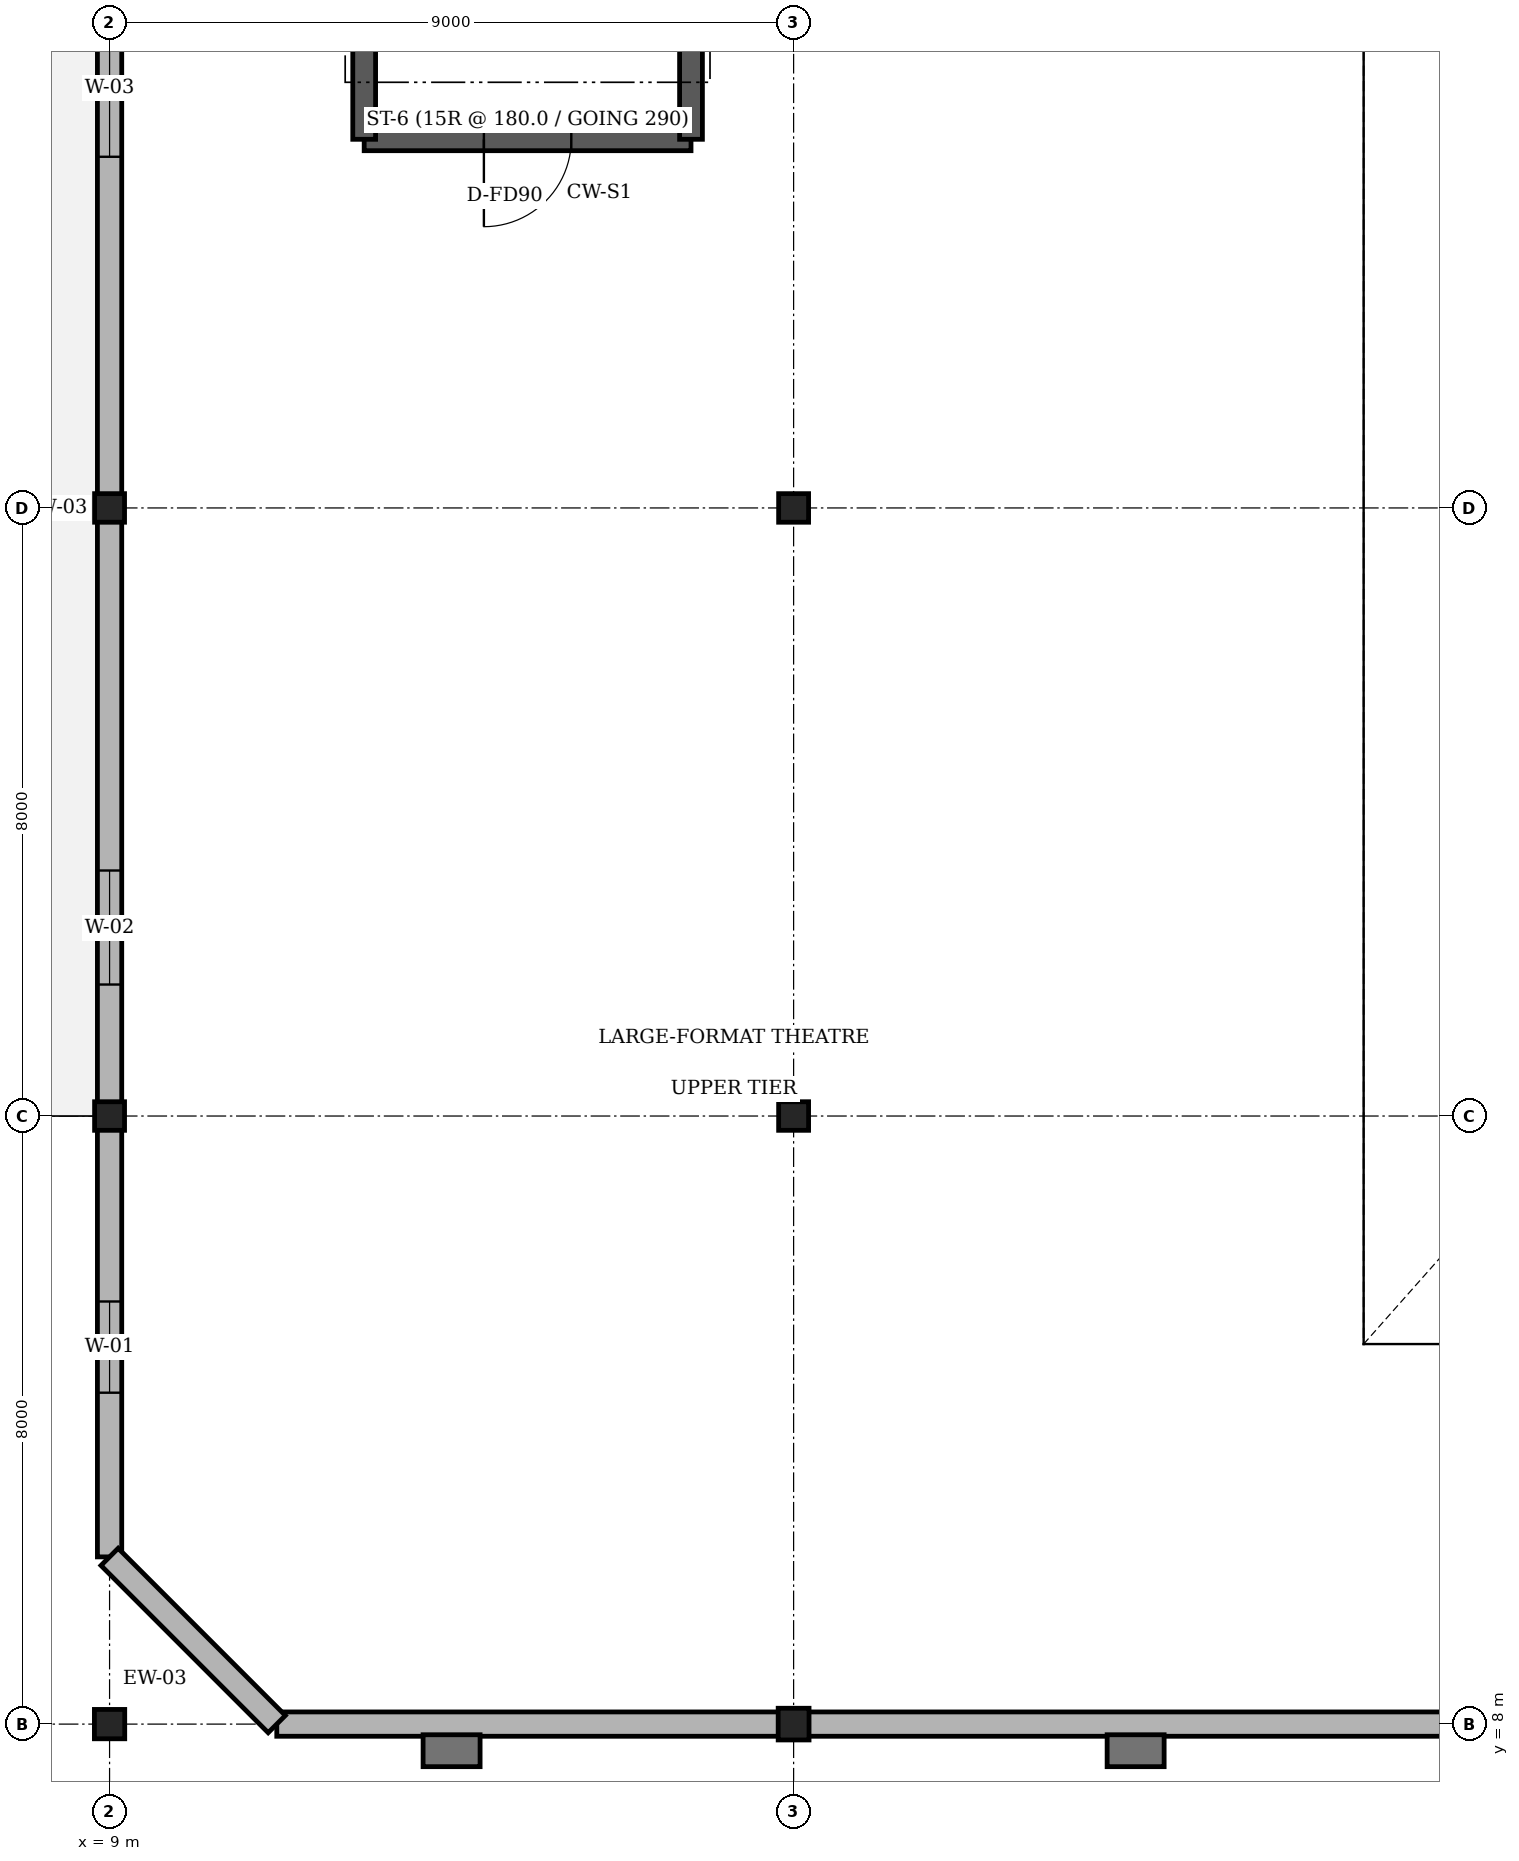
"""IFC4 building model, lengths in metres.
Left out: names, types, materials, properties, quantities, classifications, styles, units other than length and angle.
Written with IfcOpenShell. Run it as: python <this file> out.ifc"""

import sys

from ifc_helpers import new_model, si_unit, direction, frame, frame_2d, origin, origin_2d, place, context, subcontext, project, spatial, rectangle, i_section, extrude, element, fill, save


model = new_model("IFC4")
c1 = context("Model", 3, precision=1e-05, world=origin(), true_north=direction((0.0, 1.0)))
c2 = subcontext(c1, "Body", "Model", "MODEL_VIEW")
j1 = project(units=[si_unit("LENGTHUNIT", "METRE"), si_unit("PLANEANGLEUNIT", "RADIAN")], contexts=[c1])
p1 = place(None, origin())
s1 = spatial("IfcSite", under=j1, at=p1, CompositionType="ELEMENT")
p2 = place(p1, origin())
s2 = spatial("IfcBuilding", under=s1, at=p2, CompositionType="ELEMENT")
p3 = place(p2, frame((0.0, 0.0, 5.4)))
s3 = spatial("IfcBuildingStorey", under=s2, at=p3, CompositionType="ELEMENT", Elevation=5.4)
p4 = place(p3, frame((9.0, 8.0, 0.0), z_axis=(0.0, 0.0, 1.0), x_axis=(1.0, 0.0, 0.0)))
e1 = element("IfcColumn", 1, at=p4, inside=s3, PredefinedType="COLUMN", context=c2, shape_type="SweptSolid", body=[
    extrude(i_section(OverallWidth=0.399, OverallDepth=0.386, WebThickness=0.021, FlangeThickness=0.033, FilletRadius=0.015, at=origin_2d()), origin(), (0.0, 0.0, 1.0), 5.4),
])
p5 = place(p3, frame((18.0, 8.0, 0.0), z_axis=(0.0, 0.0, 1.0), x_axis=(1.0, 0.0, 0.0)))
e2 = element("IfcColumn", 2, at=p5, inside=s3, PredefinedType="COLUMN", context=c2, shape_type="SweptSolid", body=[
    extrude(i_section(OverallWidth=0.406, OverallDepth=0.417, WebThickness=0.03, FlangeThickness=0.044, FilletRadius=0.015, at=origin_2d()), origin(), (0.0, 0.0, 1.0), 5.4),
])
for number, where, z_axis, x_axis in (
    (3, (9.0, 16.0, 0.0), (0.0, 0.0, 1.0), (1.0, 0.0, 0.0)),
    (4, (9.0, 24.0, 0.0), (0.0, 0.0, 1.0), (1.0, 0.0, 0.0)),
    (5, (18.0, 16.0, 0.0), (0.0, 0.0, 1.0), (1.0, 0.0, 0.0)),
    (6, (18.0, 24.0, 0.0), (0.0, 0.0, 1.0), (1.0, 0.0, 0.0)),
):
    element("IfcColumn", number, at=place(p3, frame(where, z_axis=z_axis, x_axis=x_axis)), inside=s3, PredefinedType="COLUMN", context=c2, shape_type="SweptSolid", body=[
        extrude(i_section(OverallWidth=0.394, OverallDepth=0.376, WebThickness=0.017, FlangeThickness=0.028, FilletRadius=0.015, at=origin_2d()), origin(), (0.0, 0.0, 1.0), 5.4),
    ])
for number, where, z_axis, x_axis in (
    (7, (13.5, 7.65, 0.0), (0.0, 0.0, 1.0), (1.0, 0.0, 0.0)),
    (8, (22.5, 7.65, 0.0), (0.0, 0.0, 1.0), (1.0, 0.0, 0.0)),
):
    element("IfcColumn", number, at=place(p3, frame(where, z_axis=z_axis, x_axis=x_axis)), inside=s3, PredefinedType="PILASTER", context=c2, shape_type="SweptSolid", body=[
        extrude(rectangle(XDim=0.75, YDim=0.42, at=origin_2d()), origin(), (0.0, 0.0, 1.0), 5.4),
    ])
p6 = place(p3, frame((9.0, 10.2, 0.0), z_axis=(0.0, 0.0, 1.0), x_axis=(0.0, 1.0, 0.0)))
e9 = element("IfcWall", 9, at=p6, inside=s3, PredefinedType="SOLIDWALL", context=c2, shape_type="SweptSolid", body=[
    extrude(rectangle(XDim=27.6, YDim=0.32, at=frame_2d((13.8, 0.0))), origin(), (0.0, 0.0, 1.0), 4.246),
])
p7 = place(p6, frame((2.16, 0.0, 1.0)))
e10 = element("IfcOpeningElement", 10, at=p7, cuts=e9, PredefinedType="OPENING", context=c2, shape_type="SweptSolid", body=[
    extrude(rectangle(XDim=1.2, YDim=1.8, at=frame_2d((0.6, 0.9))), frame((0.0, 0.17, 0.0), z_axis=(0.0, -1.0, 0.0), x_axis=(1.0, 0.0, 0.0)), (0.0, 0.0, 1.0), 0.34),
])
p8 = place(p6, frame((7.53, 0.0, 1.0)))
e11 = element("IfcOpeningElement", 11, at=p8, cuts=e9, PredefinedType="OPENING", context=c2, shape_type="SweptSolid", body=[
    extrude(rectangle(XDim=1.5, YDim=1.8, at=frame_2d((0.75, 0.9))), frame((0.0, 0.17, 0.0), z_axis=(0.0, -1.0, 0.0), x_axis=(1.0, 0.0, 0.0)), (0.0, 0.0, 1.0), 0.34),
])
p9 = place(p6, frame((18.42, 0.0, 1.0)))
e12 = element("IfcOpeningElement", 12, at=p9, cuts=e9, PredefinedType="OPENING", context=c2, shape_type="SweptSolid", body=[
    extrude(rectangle(XDim=1.8, YDim=1.8, at=frame_2d((0.9, 0.9))), frame((0.0, 0.17, 0.0), z_axis=(0.0, -1.0, 0.0), x_axis=(1.0, 0.0, 0.0)), (0.0, 0.0, 1.0), 0.34),
])
p10 = place(p6, frame((23.79, 0.0, 1.0)))
e13 = element("IfcOpeningElement", 13, at=p10, cuts=e9, PredefinedType="OPENING", context=c2, shape_type="SweptSolid", body=[
    extrude(rectangle(XDim=2.1, YDim=1.8, at=frame_2d((1.05, 0.9))), frame((0.0, 0.17, 0.0), z_axis=(0.0, -1.0, 0.0), x_axis=(1.0, 0.0, 0.0)), (0.0, 0.0, 1.0), 0.34),
])
p11 = place(p3, frame((51.8, 8.0, 0.0), z_axis=(0.0, 0.0, 1.0), x_axis=(-1.0, 0.0, 0.0)))
e14 = element("IfcWall", 14, at=p11, inside=s3, PredefinedType="SOLIDWALL", context=c2, shape_type="SweptSolid", body=[
    extrude(rectangle(XDim=40.6, YDim=0.32, at=frame_2d((20.3, 0.0))), origin(), (0.0, 0.0, 1.0), 4.193),
])
p12 = place(p3, frame((11.2, 8.0, 0.0), z_axis=(0.0, 0.0, 1.0), x_axis=(-0.707106781187, 0.707106781187, 0.0)))
e15 = element("IfcWall", 15, at=p12, inside=s3, PredefinedType="SOLIDWALL", context=c2, shape_type="SweptSolid", body=[
    extrude(rectangle(XDim=3.111, YDim=0.32, at=frame_2d((1.556, 0.0))), origin(), (0.0, 0.0, 1.0), 4.193),
])
p13 = place(p3, frame((16.65, 28.85, 0.0), z_axis=(0.0, 0.0, 1.0), x_axis=(-1.0, 0.0, 0.0)))
e16 = element("IfcWall", 16, at=p13, inside=s3, PredefinedType="SOLIDWALL", context=c2, shape_type="SweptSolid", body=[
    extrude(rectangle(XDim=4.3, YDim=0.3, at=frame_2d((2.15, 0.0))), origin(), (0.0, 0.0, 1.0), 5.4),
])
p14 = place(p13, frame((1.575, 0.0, 0.0)))
e17 = element("IfcOpeningElement", 17, at=p14, cuts=e16, PredefinedType="OPENING", context=c2, shape_type="SweptSolid", body=[
    extrude(rectangle(XDim=1.15, YDim=2.2, at=frame_2d((0.575, 1.1))), frame((0.0, 0.16, 0.0), z_axis=(0.0, -1.0, 0.0), x_axis=(1.0, 0.0, 0.0)), (0.0, 0.0, 1.0), 0.32),
])
for number, where, z_axis, x_axis in (
    (18, (16.65, 28.85, 0.0), (0.0, 0.0, 1.0), (0.0, 1.0, 0.0)),
    (19, (12.35, 28.85, 0.0), (0.0, 0.0, 1.0), (0.0, 1.0, 0.0)),
):
    element("IfcWall", number, at=place(p3, frame(where, z_axis=z_axis, x_axis=x_axis)), inside=s3, PredefinedType="SOLIDWALL", context=c2, shape_type="SweptSolid", body=[
        extrude(rectangle(XDim=8.4, YDim=0.3, at=frame_2d((4.2, 0.0))), origin(), (0.0, 0.0, 1.0), 5.4),
    ])
p15 = place(p7, origin())
e20 = element("IfcWindow", 20, at=p15, inside=s3, PartitioningType="SINGLE_PANEL", PredefinedType="WINDOW", context=c2, shape_type="SweptSolid", body=[
    extrude(rectangle(XDim=1.2, YDim=1.8, at=frame_2d((0.6, 0.9))), frame((0.0, 0.03, 0.0), z_axis=(0.0, -1.0, 0.0), x_axis=(1.0, 0.0, 0.0)), (0.0, 0.0, 1.0), 0.06),
])
fill(e10, e20)
p16 = place(p8, origin())
e21 = element("IfcWindow", 21, at=p16, inside=s3, PartitioningType="SINGLE_PANEL", PredefinedType="WINDOW", context=c2, shape_type="SweptSolid", body=[
    extrude(rectangle(XDim=1.5, YDim=1.8, at=frame_2d((0.75, 0.9))), frame((0.0, 0.03, 0.0), z_axis=(0.0, -1.0, 0.0), x_axis=(1.0, 0.0, 0.0)), (0.0, 0.0, 1.0), 0.06),
])
fill(e11, e21)
p17 = place(p9, origin())
e22 = element("IfcWindow", 22, at=p17, inside=s3, PartitioningType="SINGLE_PANEL", PredefinedType="WINDOW", context=c2, shape_type="SweptSolid", body=[
    extrude(rectangle(XDim=1.8, YDim=1.8, at=frame_2d((0.9, 0.9))), frame((0.0, 0.03, 0.0), z_axis=(0.0, -1.0, 0.0), x_axis=(1.0, 0.0, 0.0)), (0.0, 0.0, 1.0), 0.06),
])
fill(e12, e22)
p18 = place(p14, origin())
e23 = element("IfcDoor", 23, at=p18, inside=s3, OperationType="SINGLE_SWING_RIGHT", PredefinedType="DOOR", context=c2, shape_type="SweptSolid", body=[
    extrude(rectangle(XDim=1.15, YDim=2.2, at=frame_2d((0.575, 1.1))), frame((0.0, 0.025, 0.0), z_axis=(0.0, -1.0, 0.0), x_axis=(1.0, 0.0, 0.0)), (0.0, 0.0, 1.0), 0.05),
])
fill(e17, e23)
save(model, sys.argv[1])
